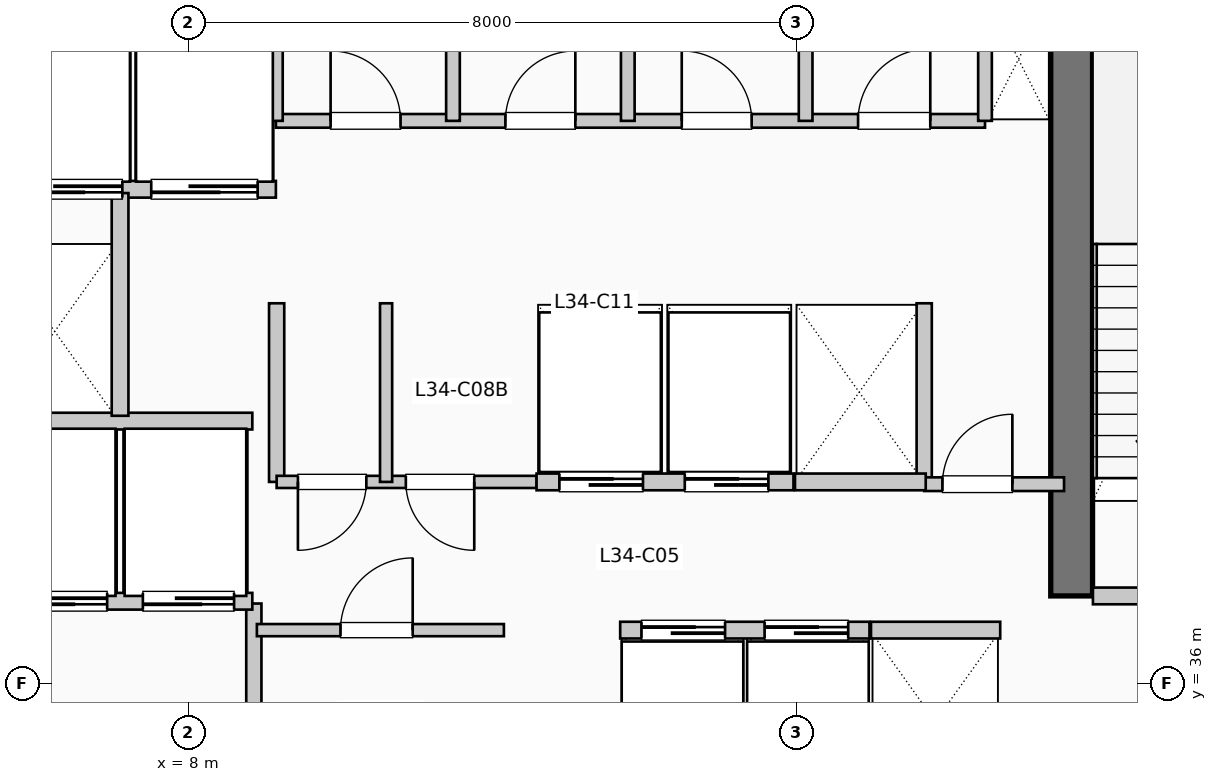
"""IFC4 building model, lengths in metres.
Left out: names, types, materials, properties, quantities, classifications, styles, units other than length and angle.
Written with IfcOpenShell. Run it as: python <this file> out.ifc"""

import sys

from ifc_helpers import new_model, si_unit, direction, frame, frame_2d, origin, place, context, subcontext, project, spatial, rectangle, extrude, element, fill, save


model = new_model("IFC4")
c1 = context("Model", 3, precision=1e-05, world=origin(), true_north=direction((0.0, 1.0)))
c2 = subcontext(c1, "Body", "Model", "MODEL_VIEW")
j1 = project(units=[si_unit("LENGTHUNIT", "METRE"), si_unit("PLANEANGLEUNIT", "RADIAN")], contexts=[c1])
p1 = place(None, origin())
s1 = spatial("IfcSite", under=j1, at=p1, CompositionType="ELEMENT")
p2 = place(p1, origin())
s2 = spatial("IfcBuilding", under=s1, at=p2, CompositionType="ELEMENT")
p3 = place(p2, frame((0.0, 0.0, 142.89)))
s3 = spatial("IfcBuildingStorey", under=s2, at=p3, CompositionType="ELEMENT", Elevation=142.89)
p4 = place(p3, frame((19.62, 37.15, 0.0), z_axis=(0.0, 0.0, 1.0), x_axis=(0.0, 1.0, 0.0)))
e1 = element("IfcWall", 1, at=p4, inside=s3, PredefinedType="SHEAR", context=c2, shape_type="SweptSolid", body=[
    extrude(rectangle(XDim=7.89, YDim=0.55, at=frame_2d((3.945, 0.0))), origin(), (0.0, 0.0, 1.0), 3.96),
])
p5 = place(p3, frame((8.86, 34.55, 0.0), z_axis=(0.0, 0.0, 1.0), x_axis=(0.0, 1.0, 0.0)))
e2 = element("IfcWall", 2, at=p5, inside=s3, PredefinedType="PARTITIONING", context=c2, shape_type="SweptSolid", body=[
    extrude(rectangle(XDim=2.5, YDim=0.2, at=frame_2d((1.25, 0.0))), origin(), (0.0, 0.0, 1.0), 3.71),
])
p6 = place(p3, frame((19.9, 37.15, 0.0), z_axis=(0.0, 0.0, 1.0), x_axis=(1.0, 0.0, 0.0)))
e3 = element("IfcWall", 3, at=p6, inside=s3, PredefinedType="PARTITIONING", context=c2, shape_type="SweptSolid", body=[
    extrude(rectangle(XDim=3.15, YDim=0.22, at=frame_2d((1.575, 0.0))), origin(), (0.0, 0.0, 1.0), 3.71),
])
p7 = place(p6, frame((2.05, 0.0, 0.0), z_axis=(0.0, 0.0, 1.0), x_axis=(-1.0, 0.0, 0.0)))
e4 = element("IfcOpeningElement", 4, at=p7, cuts=e3, PredefinedType="OPENING", context=c2, shape_type="SweptSolid", body=[
    extrude(rectangle(XDim=1.05, YDim=2.15, at=frame_2d((0.525, 1.075))), frame((0.0, 0.12, 0.0), z_axis=(0.0, -1.0, 0.0), x_axis=(1.0, 0.0, 0.0)), (0.0, 0.0, 1.0), 0.24),
])
p8 = place(p3, frame((5.38, 37.08, 0.0), z_axis=(0.0, 0.0, 1.0), x_axis=(1.0, 0.0, 0.0)))
e5 = element("IfcWall", 5, at=p8, inside=s3, PredefinedType="PARTITIONING", context=c2, shape_type="SweptSolid", body=[
    extrude(rectangle(XDim=3.46, YDim=0.22, at=frame_2d((1.73, 0.0))), origin(), (0.0, 0.0, 1.0), 3.71),
])
p9 = place(p8, frame((1.55, 0.0, 0.0), z_axis=(0.0, 0.0, 1.0), x_axis=(-1.0, 0.0, 0.0)))
e6 = element("IfcOpeningElement", 6, at=p9, cuts=e5, PredefinedType="OPENING", context=c2, shape_type="SweptSolid", body=[
    extrude(rectangle(XDim=1.2, YDim=2.2, at=frame_2d((0.6, 1.1))), frame((0.0, 0.12, 0.0), z_axis=(0.0, -1.0, 0.0), x_axis=(1.0, 0.0, 0.0)), (0.0, 0.0, 1.0), 0.24),
])
p10 = place(p8, frame((3.22, 0.0, 0.0), z_axis=(0.0, 0.0, 1.0), x_axis=(-1.0, 0.0, 0.0)))
e7 = element("IfcOpeningElement", 7, at=p10, cuts=e5, PredefinedType="OPENING", context=c2, shape_type="SweptSolid", body=[
    extrude(rectangle(XDim=1.2, YDim=2.2, at=frame_2d((0.6, 1.1))), frame((0.0, 0.12, 0.0), z_axis=(0.0, -1.0, 0.0), x_axis=(1.0, 0.0, 0.0)), (0.0, 0.0, 1.0), 0.24),
])
p11 = place(p3, frame((5.38, 39.45, 0.0), z_axis=(0.0, 0.0, 1.0), x_axis=(1.0, 0.0, 0.0)))
e8 = element("IfcWall", 8, at=p11, inside=s3, PredefinedType="PARTITIONING", context=c2, shape_type="SweptSolid", body=[
    extrude(rectangle(XDim=3.46, YDim=0.22, at=frame_2d((1.73, 0.0))), origin(), (0.0, 0.0, 1.0), 3.71),
])
p12 = place(p3, frame((5.38, 42.5, 0.0), z_axis=(0.0, 0.0, 1.0), x_axis=(1.0, 0.0, 0.0)))
e9 = element("IfcWall", 9, at=p12, inside=s3, PredefinedType="PARTITIONING", context=c2, shape_type="SweptSolid", body=[
    extrude(rectangle(XDim=3.77, YDim=0.22, at=frame_2d((1.885, 0.0))), origin(), (0.0, 0.0, 1.0), 3.71),
])
p13 = place(p12, frame((1.75, 0.0, 0.0), z_axis=(0.0, 0.0, 1.0), x_axis=(-1.0, 0.0, 0.0)))
e10 = element("IfcOpeningElement", 10, at=p13, cuts=e9, PredefinedType="OPENING", context=c2, shape_type="SweptSolid", body=[
    extrude(rectangle(XDim=1.4, YDim=2.2, at=frame_2d((0.7, 1.1))), frame((0.0, 0.12, 0.0), z_axis=(0.0, -1.0, 0.0), x_axis=(1.0, 0.0, 0.0)), (0.0, 0.0, 1.0), 0.24),
])
p14 = place(p12, frame((3.53, 0.0, 0.0), z_axis=(0.0, 0.0, 1.0), x_axis=(-1.0, 0.0, 0.0)))
e11 = element("IfcOpeningElement", 11, at=p14, cuts=e9, PredefinedType="OPENING", context=c2, shape_type="SweptSolid", body=[
    extrude(rectangle(XDim=1.4, YDim=2.2, at=frame_2d((0.7, 1.1))), frame((0.0, 0.12, 0.0), z_axis=(0.0, -1.0, 0.0), x_axis=(1.0, 0.0, 0.0)), (0.0, 0.0, 1.0), 0.24),
])
p15 = place(p3, frame((7.1, 39.52, 0.0), z_axis=(0.0, 0.0, 1.0), x_axis=(0.0, 1.0, 0.0)))
e12 = element("IfcWall", 12, at=p15, inside=s3, PredefinedType="PARTITIONING", context=c2, shape_type="SweptSolid", body=[
    extrude(rectangle(XDim=2.93, YDim=0.22, at=frame_2d((1.465, 0.0))), origin(), (0.0, 0.0, 1.0), 3.71),
])
for number, where, z_axis, x_axis in (
    (13, (9.16, 38.65, 0.0), (0.0, 0.0, 1.0), (0.0, 1.0, 0.0)),
    (14, (17.68, 38.65, 0.0), (0.0, 0.0, 1.0), (0.0, 1.0, 0.0)),
):
    element("IfcWall", number, at=place(p3, frame(where, z_axis=z_axis, x_axis=x_axis)), inside=s3, PredefinedType="PARTITIONING", context=c2, shape_type="SweptSolid", body=[
        extrude(rectangle(XDim=2.35, YDim=0.2, at=frame_2d((1.175, 0.0))), origin(), (0.0, 0.0, 1.0), 3.71),
    ])
p16 = place(p3, frame((17.68, 38.62, 0.0), z_axis=(0.0, 0.0, 1.0), x_axis=(1.0, 0.0, 0.0)))
e15 = element("IfcWall", 15, at=p16, inside=s3, PredefinedType="PARTITIONING", context=c2, shape_type="SweptSolid", body=[
    extrude(rectangle(XDim=1.84, YDim=0.18, at=frame_2d((0.92, 0.0))), origin(), (0.0, 0.0, 1.0), 3.71),
])
p17 = place(p16, frame((0.24, 0.0, 0.0)))
e16 = element("IfcOpeningElement", 16, at=p17, cuts=e15, PredefinedType="OPENING", context=c2, shape_type="SweptSolid", body=[
    extrude(rectangle(XDim=0.92, YDim=2.1, at=frame_2d((0.46, 1.05))), frame((0.0, 0.1, 0.0), z_axis=(0.0, -1.0, 0.0), x_axis=(1.0, 0.0, 0.0)), (0.0, 0.0, 1.0), 0.2),
])
p18 = place(p3, frame((8.9, 36.7, 0.0), z_axis=(0.0, 0.0, 1.0), x_axis=(1.0, 0.0, 0.0)))
e17 = element("IfcWall", 17, at=p18, inside=s3, PredefinedType="PARTITIONING", context=c2, shape_type="SweptSolid", body=[
    extrude(rectangle(XDim=3.25, YDim=0.16, at=frame_2d((1.625, 0.0))), origin(), (0.0, 0.0, 1.0), 3.71),
])
p19 = place(p18, frame((1.1, 0.0, 0.0)))
e18 = element("IfcOpeningElement", 18, at=p19, cuts=e17, PredefinedType="OPENING", context=c2, shape_type="SweptSolid", body=[
    extrude(rectangle(XDim=0.95, YDim=2.15, at=frame_2d((0.475, 1.075))), frame((0.0, 0.09, 0.0), z_axis=(0.0, -1.0, 0.0), x_axis=(1.0, 0.0, 0.0)), (0.0, 0.0, 1.0), 0.18),
])
p20 = place(p3, frame((9.16, 38.65, 0.0), z_axis=(0.0, 0.0, 1.0), x_axis=(1.0, 0.0, 0.0)))
e19 = element("IfcWall", 19, at=p20, inside=s3, PredefinedType="PARTITIONING", context=c2, shape_type="SweptSolid", body=[
    extrude(rectangle(XDim=3.42, YDim=0.16, at=frame_2d((1.71, 0.0))), origin(), (0.0, 0.0, 1.0), 3.71),
])
p21 = place(p20, frame((1.18, 0.0, 0.0), z_axis=(0.0, 0.0, 1.0), x_axis=(-1.0, 0.0, 0.0)))
e20 = element("IfcOpeningElement", 20, at=p21, cuts=e19, PredefinedType="OPENING", context=c2, shape_type="SweptSolid", body=[
    extrude(rectangle(XDim=0.9, YDim=2.15, at=frame_2d((0.45, 1.075))), frame((0.0, 0.09, 0.0), z_axis=(0.0, -1.0, 0.0), x_axis=(1.0, 0.0, 0.0)), (0.0, 0.0, 1.0), 0.18),
])
p22 = place(p20, frame((2.6, 0.0, 0.0), z_axis=(0.0, 0.0, 1.0), x_axis=(-1.0, 0.0, 0.0)))
e21 = element("IfcOpeningElement", 21, at=p22, cuts=e19, PredefinedType="OPENING", context=c2, shape_type="SweptSolid", body=[
    extrude(rectangle(XDim=0.9, YDim=2.15, at=frame_2d((0.45, 1.075))), frame((0.0, 0.09, 0.0), z_axis=(0.0, -1.0, 0.0), x_axis=(1.0, 0.0, 0.0)), (0.0, 0.0, 1.0), 0.18),
])
p23 = place(p3, frame((10.6, 38.65, 0.0), z_axis=(0.0, 0.0, 1.0), x_axis=(0.0, 1.0, 0.0)))
e22 = element("IfcWall", 22, at=p23, inside=s3, PredefinedType="PARTITIONING", context=c2, shape_type="SweptSolid", body=[
    extrude(rectangle(XDim=2.35, YDim=0.16, at=frame_2d((1.175, 0.0))), origin(), (0.0, 0.0, 1.0), 3.71),
])
p24 = place(p3, frame((13.68, 36.7, 0.0), z_axis=(0.0, 0.0, 1.0), x_axis=(1.0, 0.0, 0.0)))
e23 = element("IfcWall", 23, at=p24, inside=s3, PredefinedType="PARTITIONING", context=c2, shape_type="SweptSolid", body=[
    extrude(rectangle(XDim=3.28, YDim=0.22, at=frame_2d((1.64, 0.0))), origin(), (0.0, 0.0, 1.0), 3.71),
])
p25 = place(p24, frame((0.28, 0.0, 0.0)))
e24 = element("IfcOpeningElement", 24, at=p25, cuts=e23, PredefinedType="OPENING", context=c2, shape_type="SweptSolid", body=[
    extrude(rectangle(XDim=1.1, YDim=2.2, at=frame_2d((0.55, 1.1))), frame((0.0, 0.12, 0.0), z_axis=(0.0, -1.0, 0.0), x_axis=(1.0, 0.0, 0.0)), (0.0, 0.0, 1.0), 0.24),
])
p26 = place(p24, frame((1.9, 0.0, 0.0)))
e25 = element("IfcOpeningElement", 25, at=p26, cuts=e23, PredefinedType="OPENING", context=c2, shape_type="SweptSolid", body=[
    extrude(rectangle(XDim=1.1, YDim=2.2, at=frame_2d((0.55, 1.1))), frame((0.0, 0.12, 0.0), z_axis=(0.0, -1.0, 0.0), x_axis=(1.0, 0.0, 0.0)), (0.0, 0.0, 1.0), 0.24),
])
p27 = place(p3, frame((12.58, 38.65, 0.0), z_axis=(0.0, 0.0, 1.0), x_axis=(1.0, 0.0, 0.0)))
e26 = element("IfcWall", 26, at=p27, inside=s3, PredefinedType="PARTITIONING", context=c2, shape_type="SweptSolid", body=[
    extrude(rectangle(XDim=3.38, YDim=0.22, at=frame_2d((1.69, 0.0))), origin(), (0.0, 0.0, 1.0), 3.71),
])
p28 = place(p27, frame((0.3, 0.0, 0.0)))
e27 = element("IfcOpeningElement", 27, at=p28, cuts=e26, PredefinedType="OPENING", context=c2, shape_type="SweptSolid", body=[
    extrude(rectangle(XDim=1.1, YDim=2.2, at=frame_2d((0.55, 1.1))), frame((0.0, 0.12, 0.0), z_axis=(0.0, -1.0, 0.0), x_axis=(1.0, 0.0, 0.0)), (0.0, 0.0, 1.0), 0.24),
])
p29 = place(p27, frame((1.95, 0.0, 0.0)))
e28 = element("IfcOpeningElement", 28, at=p29, cuts=e26, PredefinedType="OPENING", context=c2, shape_type="SweptSolid", body=[
    extrude(rectangle(XDim=1.1, YDim=2.2, at=frame_2d((0.55, 1.1))), frame((0.0, 0.12, 0.0), z_axis=(0.0, -1.0, 0.0), x_axis=(1.0, 0.0, 0.0)), (0.0, 0.0, 1.0), 0.24),
])
p30 = place(p3, frame((16.98, 36.7, 0.0), z_axis=(0.0, 0.0, 1.0), x_axis=(1.0, 0.0, 0.0)))
e29 = element("IfcWall", 29, at=p30, inside=s3, PredefinedType="PARTITIONING", context=c2, shape_type="SweptSolid", body=[
    extrude(rectangle(XDim=1.7, YDim=0.22, at=frame_2d((0.85, 0.0))), origin(), (0.0, 0.0, 1.0), 3.71),
])
p31 = place(p3, frame((15.98, 38.65, 0.0), z_axis=(0.0, 0.0, 1.0), x_axis=(1.0, 0.0, 0.0)))
e30 = element("IfcWall", 30, at=p31, inside=s3, PredefinedType="PARTITIONING", context=c2, shape_type="SweptSolid", body=[
    extrude(rectangle(XDim=1.72, YDim=0.22, at=frame_2d((0.86, 0.0))), origin(), (0.0, 0.0, 1.0), 3.71),
])
p32 = place(p3, frame((9.15, 43.4, 0.0), z_axis=(0.0, 0.0, 1.0), x_axis=(1.0, 0.0, 0.0)))
e31 = element("IfcWall", 31, at=p32, inside=s3, PredefinedType="PLUMBINGWALL", context=c2, shape_type="SweptSolid", body=[
    extrude(rectangle(XDim=9.33, YDim=0.18, at=frame_2d((4.665, 0.0))), origin(), (0.0, 0.0, 1.0), 3.71),
])
p33 = place(p32, frame((0.72, 0.0, 0.0)))
e32 = element("IfcOpeningElement", 32, at=p33, cuts=e31, PredefinedType="OPENING", context=c2, shape_type="SweptSolid", body=[
    extrude(rectangle(XDim=0.92, YDim=2.1, at=frame_2d((0.46, 1.05))), frame((0.0, 0.1, 0.0), z_axis=(0.0, -1.0, 0.0), x_axis=(1.0, 0.0, 0.0)), (0.0, 0.0, 1.0), 0.2),
])
p34 = place(p32, frame((3.02, 0.0, 0.0)))
e33 = element("IfcOpeningElement", 33, at=p34, cuts=e31, PredefinedType="OPENING", context=c2, shape_type="SweptSolid", body=[
    extrude(rectangle(XDim=0.92, YDim=2.1, at=frame_2d((0.46, 1.05))), frame((0.0, 0.1, 0.0), z_axis=(0.0, -1.0, 0.0), x_axis=(1.0, 0.0, 0.0)), (0.0, 0.0, 1.0), 0.2),
])
p35 = place(p32, frame((5.34, 0.0, 0.0)))
e34 = element("IfcOpeningElement", 34, at=p35, cuts=e31, PredefinedType="OPENING", context=c2, shape_type="SweptSolid", body=[
    extrude(rectangle(XDim=0.92, YDim=2.1, at=frame_2d((0.46, 1.05))), frame((0.0, 0.1, 0.0), z_axis=(0.0, -1.0, 0.0), x_axis=(1.0, 0.0, 0.0)), (0.0, 0.0, 1.0), 0.2),
])
p36 = place(p32, frame((7.66, 0.0, 0.0)))
e35 = element("IfcOpeningElement", 35, at=p36, cuts=e31, PredefinedType="OPENING", context=c2, shape_type="SweptSolid", body=[
    extrude(rectangle(XDim=0.95, YDim=2.1, at=frame_2d((0.475, 1.05))), frame((0.0, 0.1, 0.0), z_axis=(0.0, -1.0, 0.0), x_axis=(1.0, 0.0, 0.0)), (0.0, 0.0, 1.0), 0.2),
])
for number, where, z_axis, x_axis in (
    (36, (9.15, 43.4, 0.0), (0.0, 0.0, 1.0), (0.0, 1.0, 0.0)),
    (37, (18.48, 43.4, 0.0), (0.0, 0.0, 1.0), (0.0, 1.0, 0.0)),
    (38, (11.48, 43.4, 0.0), (0.0, 0.0, 1.0), (0.0, 1.0, 0.0)),
    (39, (13.78, 43.4, 0.0), (0.0, 0.0, 1.0), (0.0, 1.0, 0.0)),
    (40, (16.12, 43.4, 0.0), (0.0, 0.0, 1.0), (0.0, 1.0, 0.0)),
):
    element("IfcWall", number, at=place(p3, frame(where, z_axis=z_axis, x_axis=x_axis)), inside=s3, PredefinedType="PLUMBINGWALL", context=c2, shape_type="SweptSolid", body=[
        extrude(rectangle(XDim=1.88, YDim=0.18, at=frame_2d((0.94, 0.0))), origin(), (0.0, 0.0, 1.0), 3.71),
    ])
p37 = place(p9, origin())
e41 = element("IfcDoor", 41, at=p37, inside=s3, OperationType="SLIDING_TO_RIGHT", PredefinedType="DOOR", context=c2, shape_type="SweptSolid", body=[
    extrude(rectangle(XDim=1.2, YDim=2.2, at=frame_2d((0.6, 1.1))), frame((0.0, 0.025, 0.0), z_axis=(0.0, -1.0, 0.0), x_axis=(1.0, 0.0, 0.0)), (0.0, 0.0, 1.0), 0.05),
])
fill(e6, e41)
p38 = place(p10, origin())
e42 = element("IfcDoor", 42, at=p38, inside=s3, OperationType="SLIDING_TO_RIGHT", PredefinedType="DOOR", context=c2, shape_type="SweptSolid", body=[
    extrude(rectangle(XDim=1.2, YDim=2.2, at=frame_2d((0.6, 1.1))), frame((0.0, 0.025, 0.0), z_axis=(0.0, -1.0, 0.0), x_axis=(1.0, 0.0, 0.0)), (0.0, 0.0, 1.0), 0.05),
])
fill(e7, e42)
p39 = place(p13, origin())
e43 = element("IfcDoor", 43, at=p39, inside=s3, OperationType="SLIDING_TO_LEFT", PredefinedType="DOOR", context=c2, shape_type="SweptSolid", body=[
    extrude(rectangle(XDim=1.4, YDim=2.2, at=frame_2d((0.7, 1.1))), frame((0.0, 0.025, 0.0), z_axis=(0.0, -1.0, 0.0), x_axis=(1.0, 0.0, 0.0)), (0.0, 0.0, 1.0), 0.05),
])
fill(e10, e43)
p40 = place(p14, origin())
e44 = element("IfcDoor", 44, at=p40, inside=s3, OperationType="SLIDING_TO_LEFT", PredefinedType="DOOR", context=c2, shape_type="SweptSolid", body=[
    extrude(rectangle(XDim=1.4, YDim=2.2, at=frame_2d((0.7, 1.1))), frame((0.0, 0.025, 0.0), z_axis=(0.0, -1.0, 0.0), x_axis=(1.0, 0.0, 0.0)), (0.0, 0.0, 1.0), 0.05),
])
fill(e11, e44)
p41 = place(p17, origin())
e45 = element("IfcDoor", 45, at=p41, inside=s3, OperationType="SINGLE_SWING_RIGHT", PredefinedType="DOOR", context=c2, shape_type="SweptSolid", body=[
    extrude(rectangle(XDim=0.92, YDim=2.1, at=frame_2d((0.46, 1.05))), frame((0.0, 0.025, 0.0), z_axis=(0.0, -1.0, 0.0), x_axis=(1.0, 0.0, 0.0)), (0.0, 0.0, 1.0), 0.05),
])
fill(e16, e45)
p42 = place(p19, origin())
e46 = element("IfcDoor", 46, at=p42, inside=s3, OperationType="SINGLE_SWING_RIGHT", PredefinedType="DOOR", context=c2, shape_type="SweptSolid", body=[
    extrude(rectangle(XDim=0.95, YDim=2.15, at=frame_2d((0.475, 1.075))), frame((0.0, 0.025, 0.0), z_axis=(0.0, -1.0, 0.0), x_axis=(1.0, 0.0, 0.0)), (0.0, 0.0, 1.0), 0.05),
])
fill(e18, e46)
p43 = place(p21, origin())
e47 = element("IfcDoor", 47, at=p43, inside=s3, OperationType="SINGLE_SWING_LEFT", PredefinedType="DOOR", context=c2, shape_type="SweptSolid", body=[
    extrude(rectangle(XDim=0.9, YDim=2.15, at=frame_2d((0.45, 1.075))), frame((0.0, 0.025, 0.0), z_axis=(0.0, -1.0, 0.0), x_axis=(1.0, 0.0, 0.0)), (0.0, 0.0, 1.0), 0.05),
])
fill(e20, e47)
p44 = place(p22, origin())
e48 = element("IfcDoor", 48, at=p44, inside=s3, OperationType="SINGLE_SWING_RIGHT", PredefinedType="DOOR", context=c2, shape_type="SweptSolid", body=[
    extrude(rectangle(XDim=0.9, YDim=2.15, at=frame_2d((0.45, 1.075))), frame((0.0, 0.025, 0.0), z_axis=(0.0, -1.0, 0.0), x_axis=(1.0, 0.0, 0.0)), (0.0, 0.0, 1.0), 0.05),
])
fill(e21, e48)
p45 = place(p25, origin())
e49 = element("IfcDoor", 49, at=p45, inside=s3, OperationType="SLIDING_TO_RIGHT", PredefinedType="DOOR", context=c2, shape_type="SweptSolid", body=[
    extrude(rectangle(XDim=1.1, YDim=2.2, at=frame_2d((0.55, 1.1))), frame((0.0, 0.025, 0.0), z_axis=(0.0, -1.0, 0.0), x_axis=(1.0, 0.0, 0.0)), (0.0, 0.0, 1.0), 0.05),
])
fill(e24, e49)
p46 = place(p26, origin())
e50 = element("IfcDoor", 50, at=p46, inside=s3, OperationType="SLIDING_TO_RIGHT", PredefinedType="DOOR", context=c2, shape_type="SweptSolid", body=[
    extrude(rectangle(XDim=1.1, YDim=2.2, at=frame_2d((0.55, 1.1))), frame((0.0, 0.025, 0.0), z_axis=(0.0, -1.0, 0.0), x_axis=(1.0, 0.0, 0.0)), (0.0, 0.0, 1.0), 0.05),
])
fill(e25, e50)
p47 = place(p28, origin())
e51 = element("IfcDoor", 51, at=p47, inside=s3, OperationType="SLIDING_TO_RIGHT", PredefinedType="DOOR", context=c2, shape_type="SweptSolid", body=[
    extrude(rectangle(XDim=1.1, YDim=2.2, at=frame_2d((0.55, 1.1))), frame((0.0, 0.025, 0.0), z_axis=(0.0, -1.0, 0.0), x_axis=(1.0, 0.0, 0.0)), (0.0, 0.0, 1.0), 0.05),
])
fill(e27, e51)
p48 = place(p29, origin())
e52 = element("IfcDoor", 52, at=p48, inside=s3, OperationType="SLIDING_TO_RIGHT", PredefinedType="DOOR", context=c2, shape_type="SweptSolid", body=[
    extrude(rectangle(XDim=1.1, YDim=2.2, at=frame_2d((0.55, 1.1))), frame((0.0, 0.025, 0.0), z_axis=(0.0, -1.0, 0.0), x_axis=(1.0, 0.0, 0.0)), (0.0, 0.0, 1.0), 0.05),
])
fill(e28, e52)
p49 = place(p33, origin())
e53 = element("IfcDoor", 53, at=p49, inside=s3, OperationType="SINGLE_SWING_LEFT", PredefinedType="DOOR", context=c2, shape_type="SweptSolid", body=[
    extrude(rectangle(XDim=0.92, YDim=2.1, at=frame_2d((0.46, 1.05))), frame((0.0, 0.025, 0.0), z_axis=(0.0, -1.0, 0.0), x_axis=(1.0, 0.0, 0.0)), (0.0, 0.0, 1.0), 0.05),
])
fill(e32, e53)
p50 = place(p34, origin())
e54 = element("IfcDoor", 54, at=p50, inside=s3, OperationType="SINGLE_SWING_RIGHT", PredefinedType="DOOR", context=c2, shape_type="SweptSolid", body=[
    extrude(rectangle(XDim=0.92, YDim=2.1, at=frame_2d((0.46, 1.05))), frame((0.0, 0.025, 0.0), z_axis=(0.0, -1.0, 0.0), x_axis=(1.0, 0.0, 0.0)), (0.0, 0.0, 1.0), 0.05),
])
fill(e33, e54)
p51 = place(p35, origin())
e55 = element("IfcDoor", 55, at=p51, inside=s3, OperationType="SINGLE_SWING_LEFT", PredefinedType="DOOR", context=c2, shape_type="SweptSolid", body=[
    extrude(rectangle(XDim=0.92, YDim=2.1, at=frame_2d((0.46, 1.05))), frame((0.0, 0.025, 0.0), z_axis=(0.0, -1.0, 0.0), x_axis=(1.0, 0.0, 0.0)), (0.0, 0.0, 1.0), 0.05),
])
fill(e34, e55)
p52 = place(p36, origin())
e56 = element("IfcDoor", 56, at=p52, inside=s3, OperationType="SINGLE_SWING_RIGHT", PredefinedType="DOOR", context=c2, shape_type="SweptSolid", body=[
    extrude(rectangle(XDim=0.95, YDim=2.1, at=frame_2d((0.475, 1.05))), frame((0.0, 0.025, 0.0), z_axis=(0.0, -1.0, 0.0), x_axis=(1.0, 0.0, 0.0)), (0.0, 0.0, 1.0), 0.05),
])
fill(e35, e56)
save(model, sys.argv[1])
